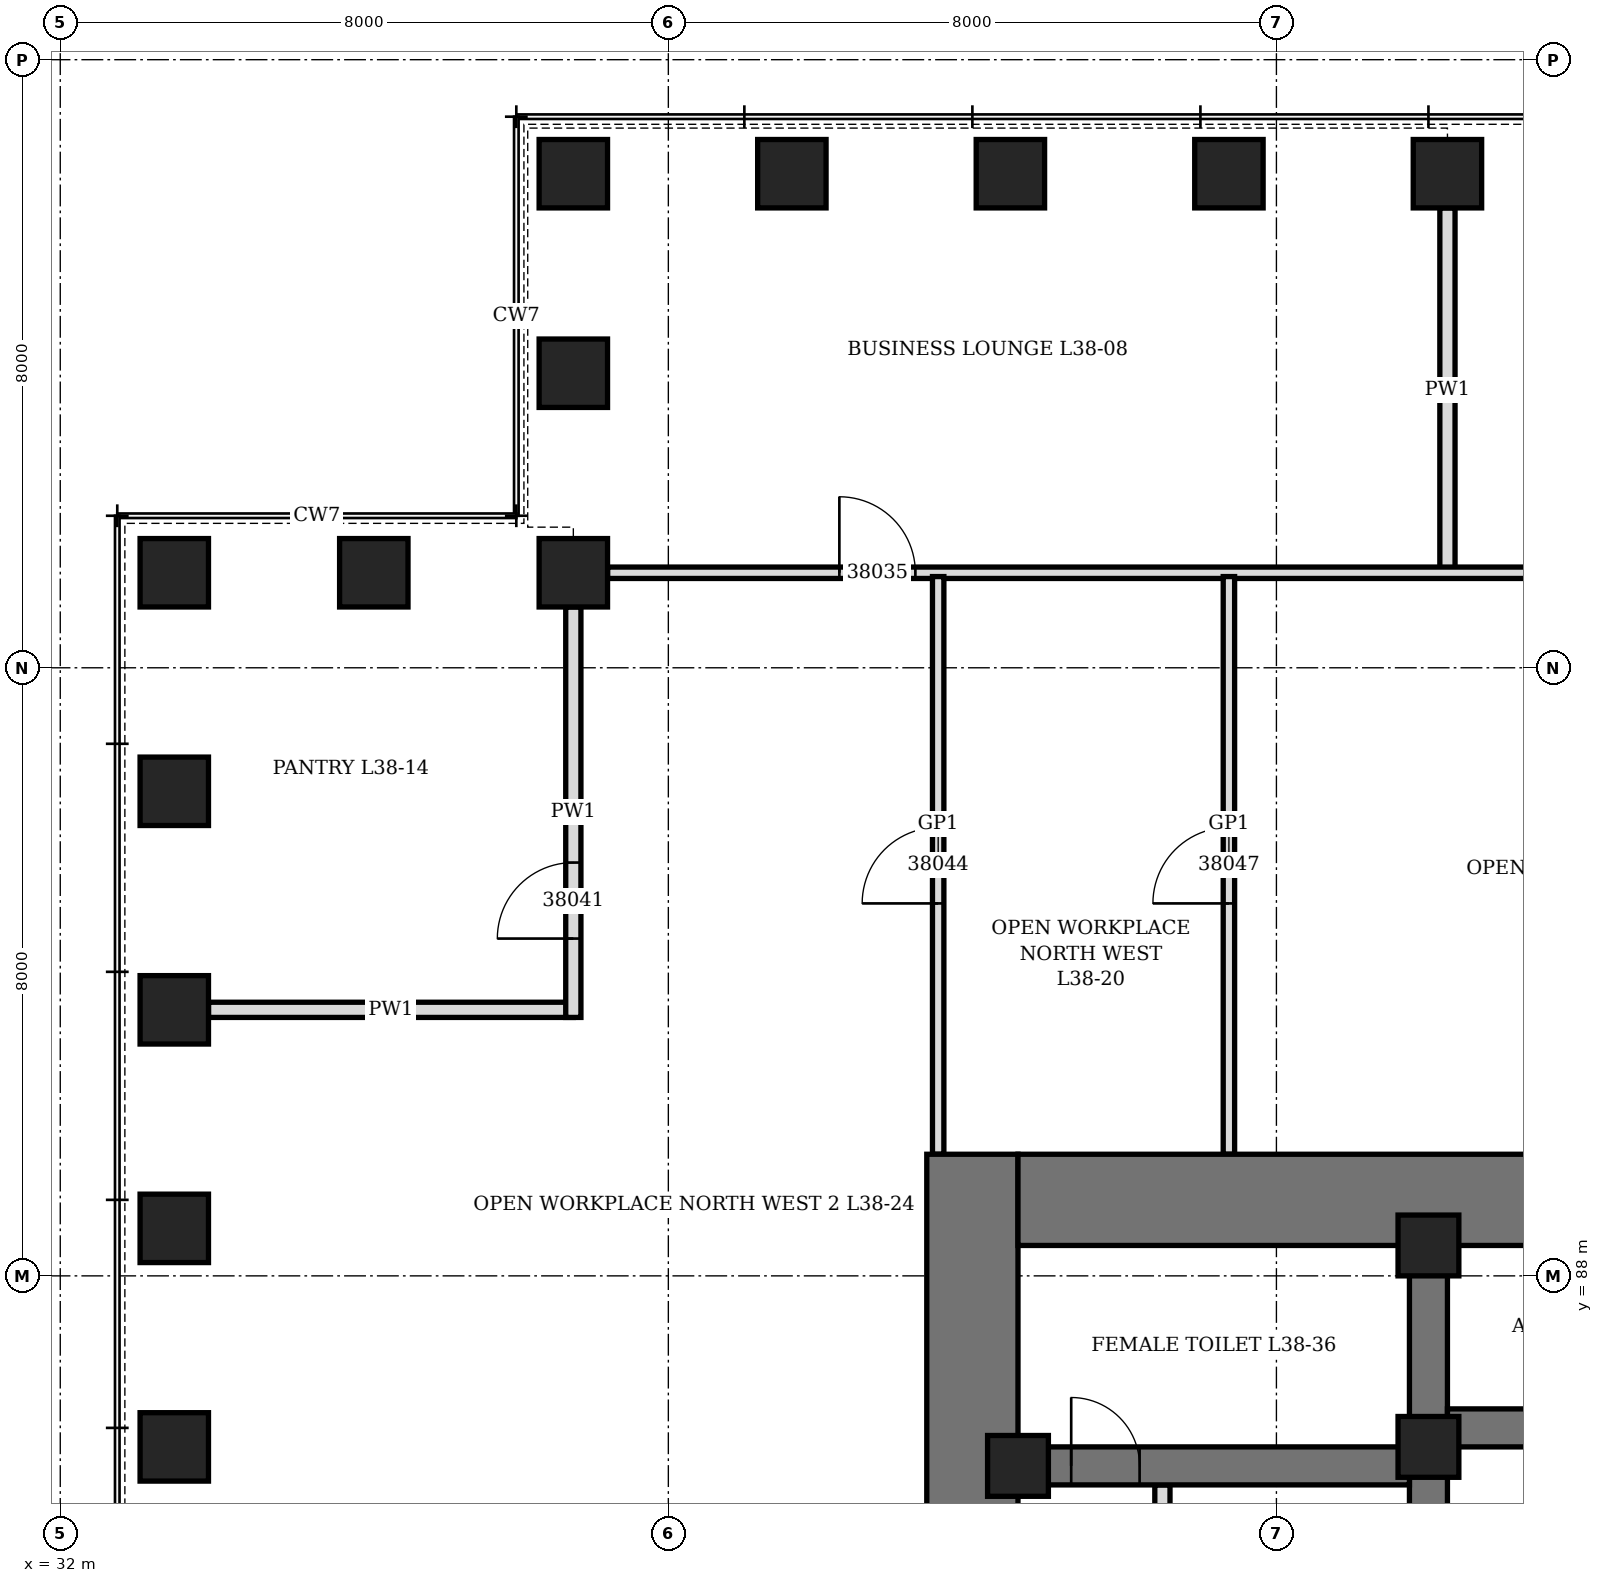
"""IFC4 building model, lengths in metres.
Left out: names, types, materials, properties, quantities, classifications, styles, units other than length and angle.
Written with IfcOpenShell. Run it as: python <this file> out.ifc"""

import sys

from ifc_helpers import new_model, si_unit, direction, frame, frame_2d, origin, origin_2d, place, context, subcontext, project, spatial, rectangle, hollow_rectangle, extrude, element, fill, save


model = new_model("IFC4")
c1 = context("Model", 3, precision=1e-05, world=origin(), true_north=direction((0.0, 1.0)))
c2 = subcontext(c1, "Body", "Model", "MODEL_VIEW")
j1 = project(units=[si_unit("LENGTHUNIT", "METRE"), si_unit("PLANEANGLEUNIT", "RADIAN")], contexts=[c1])
p1 = place(None, origin())
s1 = spatial("IfcSite", under=j1, at=p1, CompositionType="ELEMENT")
p2 = place(p1, origin())
s2 = spatial("IfcBuilding", under=s1, at=p2, CompositionType="ELEMENT")
p3 = place(p2, frame((0.0, 0.0, 171.1)))
s3 = spatial("IfcBuildingStorey", under=s2, at=p3, CompositionType="ELEMENT", Elevation=171.1)
for number, where, z_axis, x_axis in (
    (1, (50.25, 102.5, 0.0), (0.0, 0.0, 1.0), (1.0, 0.0, 0.0)),
    (2, (47.375, 102.5, 0.0), (0.0, 0.0, 1.0), (1.0, 0.0, 0.0)),
    (3, (44.5, 102.5, 0.0), (0.0, 0.0, 1.0), (1.0, 0.0, 0.0)),
    (4, (41.625, 102.5, 0.0), (0.0, 0.0, 1.0), (1.0, 0.0, 0.0)),
    (5, (38.75, 102.5, 0.0), (0.0, 0.0, 1.0), (0.0, 1.0, 0.0)),
    (6, (38.75, 99.875, 0.0), (0.0, 0.0, 1.0), (0.0, 1.0, 0.0)),
    (7, (38.75, 97.25, 0.0), (0.0, 0.0, 1.0), (1.0, 0.0, 0.0)),
    (8, (36.125, 97.25, 0.0), (0.0, 0.0, 1.0), (1.0, 0.0, 0.0)),
    (9, (33.5, 97.25, 0.0), (0.0, 0.0, 1.0), (0.0, 1.0, 0.0)),
    (10, (33.5, 94.375, 0.0), (0.0, 0.0, 1.0), (0.0, 1.0, 0.0)),
    (11, (33.5, 91.5, 0.0), (0.0, 0.0, 1.0), (0.0, 1.0, 0.0)),
    (12, (33.5, 88.625, 0.0), (0.0, 0.0, 1.0), (0.0, 1.0, 0.0)),
    (13, (33.5, 85.75, 0.0), (0.0, 0.0, 1.0), (0.0, 1.0, 0.0)),
):
    element("IfcColumn", number, at=place(p3, frame(where, z_axis=z_axis, x_axis=x_axis)), inside=s3, PredefinedType="COLUMN", context=c2, shape_type="SweptSolid", body=[
        extrude(hollow_rectangle(XDim=0.9, YDim=0.9, WallThickness=0.12, at=origin_2d()), origin(), (0.0, 0.0, 1.0), 4.2),
    ])
p4 = place(p3, frame((44.0, 70.4, 0.0), z_axis=(0.0, 0.0, 1.0), x_axis=(0.0, 1.0, 0.0)))
e14 = element("IfcWall", 14, at=p4, inside=s3, PredefinedType="SHEAR", context=c2, shape_type="SweptSolid", body=[
    extrude(rectangle(XDim=19.2, YDim=1.2, at=frame_2d((9.6, 0.0))), origin(), (0.0, 0.0, 1.0), 4.2),
])
p5 = place(p4, frame((8.6, 0.0, 0.0)))
e15 = element("IfcOpeningElement", 15, at=p5, cuts=e14, PredefinedType="OPENING", context=c2, shape_type="SweptSolid", body=[
    extrude(rectangle(XDim=2.0, YDim=2.4, at=frame_2d((1.0, 1.2))), frame((0.0, 0.61, 0.0), z_axis=(0.0, -1.0, 0.0), x_axis=(1.0, 0.0, 0.0)), (0.0, 0.0, 1.0), 1.22),
])
p6 = place(p3, frame((44.6, 89.0, 0.0), z_axis=(0.0, 0.0, 1.0), x_axis=(1.0, 0.0, 0.0)))
e16 = element("IfcWall", 16, at=p6, inside=s3, PredefinedType="SHEAR", context=c2, shape_type="SweptSolid", body=[
    extrude(rectangle(XDim=22.8, YDim=1.2, at=frame_2d((11.4, 0.0))), origin(), (0.0, 0.0, 1.0), 4.2),
])
p7 = place(p6, frame((7.9, 0.0, 0.0)))
e17 = element("IfcOpeningElement", 17, at=p7, cuts=e16, PredefinedType="OPENING", context=c2, shape_type="SweptSolid", body=[
    extrude(rectangle(XDim=1.0, YDim=2.1, at=frame_2d((0.5, 1.05))), frame((0.0, 0.61, 0.0), z_axis=(0.0, -1.0, 0.0), x_axis=(1.0, 0.0, 0.0)), (0.0, 0.0, 1.0), 1.22),
])
p8 = place(p6, frame((12.05, 0.0, 0.0)))
e18 = element("IfcOpeningElement", 18, at=p8, cuts=e16, PredefinedType="OPENING", context=c2, shape_type="SweptSolid", body=[
    extrude(rectangle(XDim=0.9, YDim=2.1, at=frame_2d((0.45, 1.05))), frame((0.0, 0.61, 0.0), z_axis=(0.0, -1.0, 0.0), x_axis=(1.0, 0.0, 0.0)), (0.0, 0.0, 1.0), 1.22),
])
p9 = place(p6, frame((13.975, 0.0, 0.0)))
e19 = element("IfcOpeningElement", 19, at=p9, cuts=e16, PredefinedType="OPENING", context=c2, shape_type="SweptSolid", body=[
    extrude(rectangle(XDim=0.9, YDim=2.1, at=frame_2d((0.45, 1.05))), frame((0.0, 0.61, 0.0), z_axis=(0.0, -1.0, 0.0), x_axis=(1.0, 0.0, 0.0)), (0.0, 0.0, 1.0), 1.22),
])
p10 = place(p3, frame((50.0, 71.6, 0.0), z_axis=(0.0, 0.0, 1.0), x_axis=(0.0, 1.0, 0.0)))
e20 = element("IfcWall", 20, at=p10, inside=s3, PredefinedType="SHEAR", context=c2, shape_type="SweptSolid", body=[
    extrude(rectangle(XDim=16.8, YDim=0.5, at=frame_2d((8.4, 0.0))), origin(), (0.0, 0.0, 1.0), 4.2),
])
p11 = place(p10, frame((7.5, 0.0, 0.0)))
e21 = element("IfcOpeningElement", 21, at=p11, cuts=e20, PredefinedType="OPENING", context=c2, shape_type="SweptSolid", body=[
    extrude(rectangle(XDim=1.8, YDim=2.4, at=frame_2d((0.9, 1.2))), frame((0.0, 0.26, 0.0), z_axis=(0.0, -1.0, 0.0), x_axis=(1.0, 0.0, 0.0)), (0.0, 0.0, 1.0), 0.52),
])
p12 = place(p3, frame((44.6, 85.5, 0.0), z_axis=(0.0, 0.0, 1.0), x_axis=(1.0, 0.0, 0.0)))
e22 = element("IfcWall", 22, at=p12, inside=s3, PredefinedType="SHEAR", context=c2, shape_type="SweptSolid", body=[
    extrude(rectangle(XDim=5.15, YDim=0.5, at=frame_2d((2.575, 0.0))), origin(), (0.0, 0.0, 1.0), 4.2),
])
p13 = place(p12, frame((0.7, 0.0, 0.0)))
e23 = element("IfcOpeningElement", 23, at=p13, cuts=e22, PredefinedType="OPENING", context=c2, shape_type="SweptSolid", body=[
    extrude(rectangle(XDim=0.9, YDim=2.1, at=frame_2d((0.45, 1.05))), frame((0.0, 0.26, 0.0), z_axis=(0.0, -1.0, 0.0), x_axis=(1.0, 0.0, 0.0)), (0.0, 0.0, 1.0), 0.52),
])
p14 = place(p3, frame((50.25, 86.0, 0.0), z_axis=(0.0, 0.0, 1.0), x_axis=(1.0, 0.0, 0.0)))
e24 = element("IfcWall", 24, at=p14, inside=s3, PredefinedType="SHEAR", context=c2, shape_type="SweptSolid", body=[
    extrude(rectangle(XDim=11.5, YDim=0.5, at=frame_2d((5.75, 0.0))), origin(), (0.0, 0.0, 1.0), 4.2),
])
for number, where, z_axis, x_axis in (
    (25, (44.6, 85.5, 0.0), (0.0, 0.0, 1.0), (1.0, 0.0, 0.0)),
    (26, (50.0, 85.75, 0.0), (0.0, 0.0, 1.0), (1.0, 0.0, 0.0)),
    (27, (50.0, 88.4, 0.0), (0.0, 0.0, 1.0), (1.0, 0.0, 0.0)),
):
    element("IfcColumn", number, at=place(p3, frame(where, z_axis=z_axis, x_axis=x_axis)), inside=s3, PredefinedType="COLUMN", context=c2, shape_type="SweptSolid", body=[
        extrude(hollow_rectangle(XDim=0.8, YDim=0.8, WallThickness=0.1, at=origin_2d()), origin(), (0.0, 0.0, 1.0), 4.2),
    ])
p15 = place(p3, frame((46.5, 82.25, 0.0), z_axis=(0.0, 0.0, 1.0), x_axis=(0.0, 1.0, 0.0)))
e28 = element("IfcWall", 28, at=p15, inside=s3, PredefinedType="PARTITIONING", context=c2, shape_type="SweptSolid", body=[
    extrude(rectangle(XDim=3.0, YDim=0.2, at=frame_2d((1.5, 0.0))), origin(), (0.0, 0.0, 1.0), 3.95),
])
p16 = place(p15, frame((1.05, 0.0, 0.0)))
e29 = element("IfcOpeningElement", 29, at=p16, cuts=e28, PredefinedType="OPENING", context=c2, shape_type="SweptSolid", body=[
    extrude(rectangle(XDim=0.9, YDim=2.1, at=frame_2d((0.45, 1.05))), frame((0.0, 0.11, 0.0), z_axis=(0.0, -1.0, 0.0), x_axis=(1.0, 0.0, 0.0)), (0.0, 0.0, 1.0), 0.22),
])
p17 = place(p3, frame((50.25, 97.25, 0.0), z_axis=(0.0, 0.0, 1.0), x_axis=(0.0, 1.0, 0.0)))
e30 = element("IfcWall", 30, at=p17, inside=s3, PredefinedType="PARTITIONING", context=c2, shape_type="SweptSolid", body=[
    extrude(rectangle(XDim=4.8, YDim=0.2, at=frame_2d((2.4, 0.0))), origin(), (0.0, 0.0, 1.0), 2.45),
])
p18 = place(p3, frame((33.95, 91.5, 0.0), z_axis=(0.0, 0.0, 1.0), x_axis=(1.0, 0.0, 0.0)))
e31 = element("IfcWall", 31, at=p18, inside=s3, PredefinedType="PARTITIONING", context=c2, shape_type="SweptSolid", body=[
    extrude(rectangle(XDim=4.8, YDim=0.2, at=frame_2d((2.4, 0.0))), origin(), (0.0, 0.0, 1.0), 3.188),
])
p19 = place(p3, frame((39.2, 97.25, 0.0), z_axis=(0.0, 0.0, 1.0), x_axis=(1.0, 0.0, 0.0)))
e32 = element("IfcWall", 32, at=p19, inside=s3, PredefinedType="PARTITIONING", context=c2, shape_type="SweptSolid", body=[
    extrude(rectangle(XDim=28.4, YDim=0.15, at=frame_2d((14.2, 0.0))), origin(), (0.0, 0.0, 1.0), 3.95),
])
p20 = place(p19, frame((3.05, 0.0, 0.0)))
e33 = element("IfcOpeningElement", 33, at=p20, cuts=e32, PredefinedType="OPENING", context=c2, shape_type="SweptSolid", body=[
    extrude(rectangle(XDim=1.0, YDim=2.4, at=frame_2d((0.5, 1.2))), frame((0.0, 0.085, 0.0), z_axis=(0.0, -1.0, 0.0), x_axis=(1.0, 0.0, 0.0)), (0.0, 0.0, 1.0), 0.17),
])
p21 = place(p19, frame((14.863, 0.0, 0.0)))
e34 = element("IfcOpeningElement", 34, at=p21, cuts=e32, PredefinedType="OPENING", context=c2, shape_type="SweptSolid", body=[
    extrude(rectangle(XDim=1.0, YDim=2.4, at=frame_2d((0.5, 1.2))), frame((0.0, 0.085, 0.0), z_axis=(0.0, -1.0, 0.0), x_axis=(1.0, 0.0, 0.0)), (0.0, 0.0, 1.0), 0.17),
])
p22 = place(p19, frame((23.488, 0.0, 0.0)))
e35 = element("IfcOpeningElement", 35, at=p22, cuts=e32, PredefinedType="OPENING", context=c2, shape_type="SweptSolid", body=[
    extrude(rectangle(XDim=1.0, YDim=2.1, at=frame_2d((0.5, 1.05))), frame((0.0, 0.085, 0.0), z_axis=(0.0, -1.0, 0.0), x_axis=(1.0, 0.0, 0.0)), (0.0, 0.0, 1.0), 0.17),
])
p23 = place(p3, frame((38.75, 91.4, 0.0), z_axis=(0.0, 0.0, 1.0), x_axis=(0.0, 1.0, 0.0)))
e36 = element("IfcWall", 36, at=p23, inside=s3, PredefinedType="PARTITIONING", context=c2, shape_type="SweptSolid", body=[
    extrude(rectangle(XDim=5.4, YDim=0.2, at=frame_2d((2.7, 0.0))), origin(), (0.0, 0.0, 1.0), 3.95),
])
p24 = place(p23, frame((1.038, 0.0, 0.0)))
e37 = element("IfcOpeningElement", 37, at=p24, cuts=e36, PredefinedType="OPENING", context=c2, shape_type="SweptSolid", body=[
    extrude(rectangle(XDim=1.0, YDim=2.1, at=frame_2d((0.5, 1.05))), frame((0.0, 0.11, 0.0), z_axis=(0.0, -1.0, 0.0), x_axis=(1.0, 0.0, 0.0)), (0.0, 0.0, 1.0), 0.22),
])
p25 = place(p3, frame((43.55, 89.6, 0.0), z_axis=(0.0, 0.0, 1.0), x_axis=(0.0, 1.0, 0.0)))
e38 = element("IfcWall", 38, at=p25, inside=s3, PredefinedType="PARTITIONING", context=c2, shape_type="SweptSolid", body=[
    extrude(rectangle(XDim=7.6, YDim=0.15, at=frame_2d((3.8, 0.0))), origin(), (0.0, 0.0, 1.0), 3.95),
])
p26 = place(p25, frame((3.3, 0.0, 0.0)))
e39 = element("IfcOpeningElement", 39, at=p26, cuts=e38, PredefinedType="OPENING", context=c2, shape_type="SweptSolid", body=[
    extrude(rectangle(XDim=1.0, YDim=2.4, at=frame_2d((0.5, 1.2))), frame((0.0, 0.085, 0.0), z_axis=(0.0, -1.0, 0.0), x_axis=(1.0, 0.0, 0.0)), (0.0, 0.0, 1.0), 0.17),
])
p27 = place(p3, frame((47.375, 89.6, 0.0), z_axis=(0.0, 0.0, 1.0), x_axis=(0.0, 1.0, 0.0)))
e40 = element("IfcWall", 40, at=p27, inside=s3, PredefinedType="PARTITIONING", context=c2, shape_type="SweptSolid", body=[
    extrude(rectangle(XDim=7.6, YDim=0.15, at=frame_2d((3.8, 0.0))), origin(), (0.0, 0.0, 1.0), 2.45),
])
p28 = place(p27, frame((3.3, 0.0, 0.0)))
e41 = element("IfcOpeningElement", 41, at=p28, cuts=e40, PredefinedType="OPENING", context=c2, shape_type="SweptSolid", body=[
    extrude(rectangle(XDim=1.0, YDim=2.4, at=frame_2d((0.5, 1.2))), frame((0.0, 0.085, 0.0), z_axis=(0.0, -1.0, 0.0), x_axis=(1.0, 0.0, 0.0)), (0.0, 0.0, 1.0), 0.17),
])
p29 = place(p13, origin())
e42 = element("IfcDoor", 42, at=p29, inside=s3, OperationType="SINGLE_SWING_RIGHT", PredefinedType="DOOR", context=c2, shape_type="SweptSolid", body=[
    extrude(rectangle(XDim=0.9, YDim=2.1, at=frame_2d((0.45, 1.05))), frame((0.0, 0.25, 0.0), z_axis=(0.0, -1.0, 0.0), x_axis=(1.0, 0.0, 0.0)), (0.0, 0.0, 1.0), 0.5),
])
fill(e23, e42)
p30 = place(p20, origin())
e43 = element("IfcDoor", 43, at=p30, inside=s3, OperationType="SINGLE_SWING_RIGHT", PredefinedType="DOOR", context=c2, shape_type="SweptSolid", body=[
    extrude(rectangle(XDim=1.0, YDim=2.4, at=frame_2d((0.5, 1.2))), frame((0.0, 0.075, 0.0), z_axis=(0.0, -1.0, 0.0), x_axis=(1.0, 0.0, 0.0)), (0.0, 0.0, 1.0), 0.149),
])
fill(e33, e43)
p31 = place(p24, origin())
e44 = element("IfcDoor", 44, at=p31, inside=s3, OperationType="SINGLE_SWING_LEFT", PredefinedType="DOOR", context=c2, shape_type="SweptSolid", body=[
    extrude(rectangle(XDim=1.0, YDim=2.1, at=frame_2d((0.5, 1.05))), frame((0.0, 0.1, 0.0), z_axis=(0.0, -1.0, 0.0), x_axis=(1.0, 0.0, 0.0)), (0.0, 0.0, 1.0), 0.199),
])
fill(e37, e44)
p32 = place(p26, origin())
e45 = element("IfcDoor", 45, at=p32, inside=s3, OperationType="SINGLE_SWING_RIGHT", PredefinedType="DOOR", context=c2, shape_type="SweptSolid", body=[
    extrude(rectangle(XDim=1.0, YDim=2.4, at=frame_2d((0.5, 1.2))), frame((0.0, 0.075, 0.0), z_axis=(0.0, -1.0, 0.0), x_axis=(1.0, 0.0, 0.0)), (0.0, 0.0, 1.0), 0.149),
])
fill(e39, e45)
p33 = place(p28, origin())
e46 = element("IfcDoor", 46, at=p33, inside=s3, OperationType="SINGLE_SWING_RIGHT", PredefinedType="DOOR", context=c2, shape_type="SweptSolid", body=[
    extrude(rectangle(XDim=1.0, YDim=2.4, at=frame_2d((0.5, 1.2))), frame((0.0, 0.075, 0.0), z_axis=(0.0, -1.0, 0.0), x_axis=(1.0, 0.0, 0.0)), (0.0, 0.0, 1.0), 0.149),
])
fill(e41, e46)
save(model, sys.argv[1])
